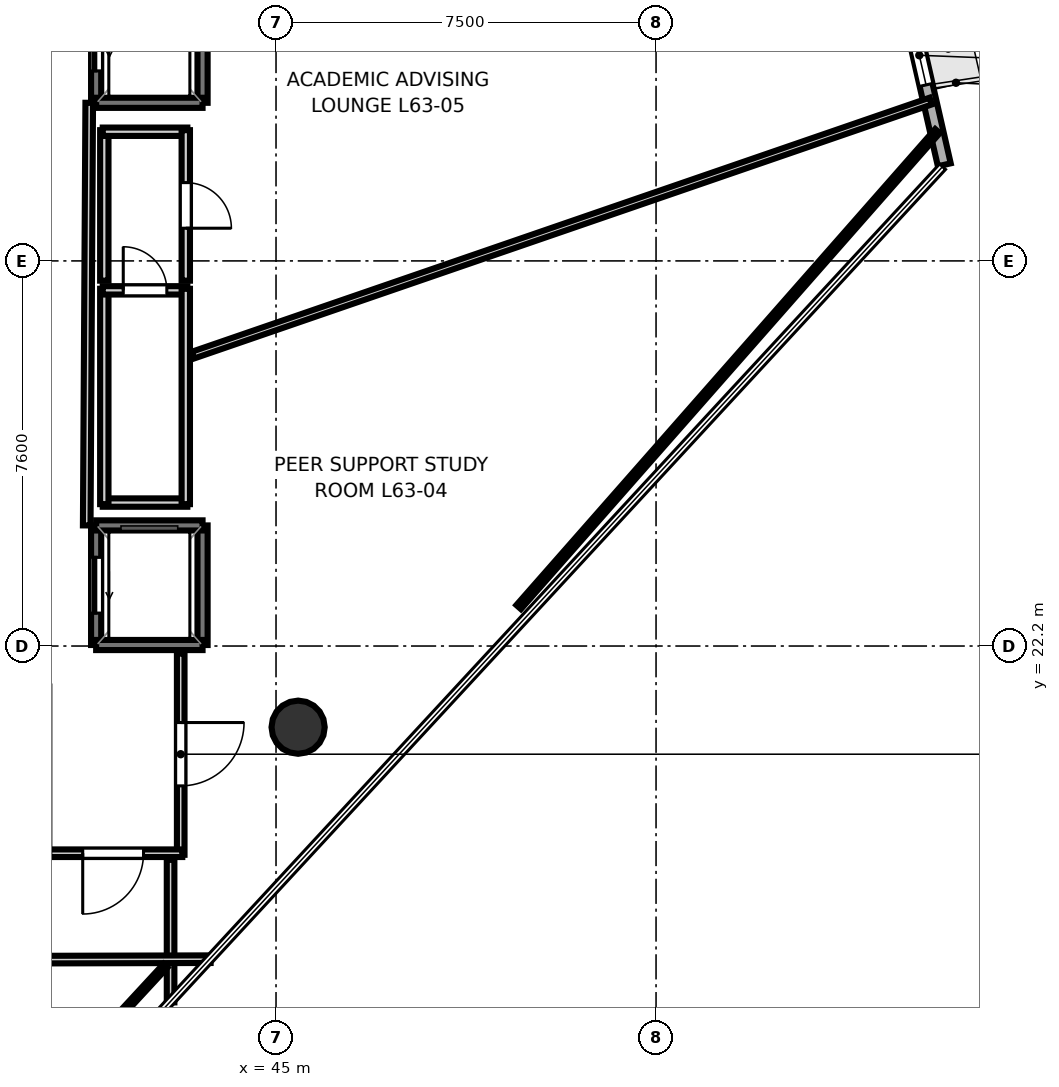
"""IFC4 building model, lengths in metres.
Left out: names, types, materials, properties, quantities, classifications, styles, units other than length and angle.
Written with IfcOpenShell. Run it as: python <this file> out.ifc"""

import sys

from ifc_helpers import new_model, si_unit, direction, frame, frame_2d, origin, origin_2d, place, context, subcontext, project, spatial, rectangle, hollow_circle, extrude, element, fill, save


model = new_model("IFC4")
c1 = context("Model", 3, precision=1e-05, world=origin(), true_north=direction((0.0, 1.0)))
c2 = subcontext(c1, "Body", "Model", "MODEL_VIEW")
j1 = project(units=[si_unit("LENGTHUNIT", "METRE"), si_unit("PLANEANGLEUNIT", "RADIAN")], contexts=[c1])
p1 = place(None, origin())
s1 = spatial("IfcSite", under=j1, at=p1, CompositionType="ELEMENT")
p2 = place(p1, origin())
s2 = spatial("IfcBuilding", under=s1, at=p2, CompositionType="ELEMENT")
p3 = place(p2, frame((0.0, 0.0, 246.4)))
s3 = spatial("IfcBuildingStorey", under=s2, at=p3, CompositionType="ELEMENT", Elevation=246.4)
p4 = place(p3, frame((45.436, 20.598, 0.0), z_axis=(0.0, 0.0, 1.0), x_axis=(1.0, 0.0, 0.0)))
e1 = element("IfcColumn", 1, at=p4, inside=s3, PredefinedType="COLUMN", context=c2, shape_type="SweptSolid", body=[
    extrude(hollow_circle(Radius=0.525, WallThickness=0.028, at=origin_2d()), origin(), (0.0, 0.0, 1.0), 3.7),
])
p5 = place(p3, frame((58.189, 31.697, 0.0), z_axis=(0.0, 0.0, 1.0), x_axis=(-0.222498189733, 0.974933103123, 0.0)))
e2 = element("IfcWall", 2, at=p5, inside=s3, PredefinedType="SOLIDWALL", context=c2, shape_type="SweptSolid", body=[
    extrude(rectangle(XDim=5.257, YDim=0.26, at=frame_2d((2.628, 0.0))), origin(), (0.0, 0.0, 1.0), 3.52),
])
p6 = place(p5, frame((1.617, 0.0, 0.9)))
e3 = element("IfcOpeningElement", 3, at=p6, cuts=e2, PredefinedType="OPENING", context=c2, shape_type="SweptSolid", body=[
    extrude(rectangle(XDim=1.2, YDim=2.0, at=frame_2d((0.6, 1.0))), frame((0.0, 0.14, 0.0), z_axis=(0.0, -1.0, 0.0), x_axis=(1.0, 0.0, 0.0)), (0.0, 0.0, 1.0), 0.28),
])
p7 = place(p3, frame((43.55, 22.22, 0.0), z_axis=(0.0, 0.0, 1.0), x_axis=(0.0, 1.0, 0.0)))
e4 = element("IfcWall", 4, at=p7, inside=s3, PredefinedType="SOLIDWALL", context=c2, shape_type="SweptSolid", body=[
    extrude(rectangle(XDim=2.36, YDim=0.2, at=frame_2d((1.18, 0.0))), origin(), (0.0, 0.0, 1.0), 3.52),
])
p8 = place(p3, frame((41.45, 22.22, 0.0), z_axis=(0.0, 0.0, 1.0), x_axis=(0.0, 1.0, 0.0)))
e5 = element("IfcWall", 5, at=p8, inside=s3, PredefinedType="SOLIDWALL", context=c2, shape_type="SweptSolid", body=[
    extrude(rectangle(XDim=2.36, YDim=0.2, at=frame_2d((1.18, 0.0))), origin(), (0.0, 0.0, 1.0), 3.52),
])
p9 = place(p8, frame((0.63, 0.0, 0.0)))
e6 = element("IfcOpeningElement", 6, at=p9, cuts=e5, PredefinedType="OPENING", context=c2, shape_type="SweptSolid", body=[
    extrude(rectangle(XDim=1.1, YDim=2.15, at=frame_2d((0.55, 1.075))), frame((0.0, 0.11, 0.0), z_axis=(0.0, -1.0, 0.0), x_axis=(1.0, 0.0, 0.0)), (0.0, 0.0, 1.0), 0.22),
])
for number, where, z_axis, x_axis in (
    (7, (41.45, 24.58, 0.0), (0.0, 0.0, 1.0), (1.0, 0.0, 0.0)),
    (8, (41.45, 22.22, 0.0), (0.0, 0.0, 1.0), (1.0, 0.0, 0.0)),
):
    element("IfcWall", number, at=place(p3, frame(where, z_axis=z_axis, x_axis=x_axis)), inside=s3, PredefinedType="SOLIDWALL", context=c2, shape_type="SweptSolid", body=[
        extrude(rectangle(XDim=2.1, YDim=0.2, at=frame_2d((1.05, 0.0))), origin(), (0.0, 0.0, 1.0), 3.52),
    ])
p10 = place(p3, frame((43.55, 32.92, 0.0), z_axis=(0.0, 0.0, 1.0), x_axis=(0.0, 1.0, 0.0)))
e9 = element("IfcWall", 9, at=p10, inside=s3, PredefinedType="SOLIDWALL", context=c2, shape_type="SweptSolid", body=[
    extrude(rectangle(XDim=2.36, YDim=0.2, at=frame_2d((1.18, 0.0))), origin(), (0.0, 0.0, 1.0), 3.52),
])
p11 = place(p3, frame((41.45, 32.92, 0.0), z_axis=(0.0, 0.0, 1.0), x_axis=(0.0, 1.0, 0.0)))
e10 = element("IfcWall", 10, at=p11, inside=s3, PredefinedType="SOLIDWALL", context=c2, shape_type="SweptSolid", body=[
    extrude(rectangle(XDim=2.36, YDim=0.2, at=frame_2d((1.18, 0.0))), origin(), (0.0, 0.0, 1.0), 3.52),
])
p12 = place(p11, frame((0.63, 0.0, 0.0)))
e11 = element("IfcOpeningElement", 11, at=p12, cuts=e10, PredefinedType="OPENING", context=c2, shape_type="SweptSolid", body=[
    extrude(rectangle(XDim=1.1, YDim=2.15, at=frame_2d((0.55, 1.075))), frame((0.0, 0.11, 0.0), z_axis=(0.0, -1.0, 0.0), x_axis=(1.0, 0.0, 0.0)), (0.0, 0.0, 1.0), 0.22),
])
p13 = place(p3, frame((41.45, 32.92, 0.0), z_axis=(0.0, 0.0, 1.0), x_axis=(1.0, 0.0, 0.0)))
e12 = element("IfcWall", 12, at=p13, inside=s3, PredefinedType="SOLIDWALL", context=c2, shape_type="SweptSolid", body=[
    extrude(rectangle(XDim=2.1, YDim=0.2, at=frame_2d((1.05, 0.0))), origin(), (0.0, 0.0, 1.0), 3.52),
])
p14 = place(p3, frame((41.313, 32.92, 0.0), z_axis=(0.0, 0.0, 1.0), x_axis=(-0.005942518022, -0.999982343084, 0.0)))
e13 = element("IfcWall", 13, at=p14, inside=s3, PredefinedType="PARTITIONING", context=c2, shape_type="SweptSolid", body=[
    extrude(rectangle(XDim=8.34, YDim=0.15, at=frame_2d((4.17, 0.0))), origin(), (0.0, 0.0, 1.0), 2.84),
])
p15 = place(p3, frame((43.119, 22.05, 0.0), z_axis=(0.0, 0.0, 1.0), x_axis=(0.0, -1.0, 0.0)))
e14 = element("IfcWall", 14, at=p15, inside=s3, PredefinedType="PARTITIONING", context=c2, shape_type="SweptSolid", body=[
    extrude(rectangle(XDim=3.97, YDim=0.15, at=frame_2d((1.985, 0.0))), origin(), (0.0, 0.0, 1.0), 2.84),
])
p16 = place(p15, frame((1.36, 0.0, 0.0)))
e15 = element("IfcOpeningElement", 15, at=p16, cuts=e14, PredefinedType="OPENING", context=c2, shape_type="SweptSolid", body=[
    extrude(rectangle(XDim=1.25, YDim=2.2, at=frame_2d((0.625, 1.1))), frame((0.0, 0.085, 0.0), z_axis=(0.0, -1.0, 0.0), x_axis=(1.0, 0.0, 0.0)), (0.0, 0.0, 1.0), 0.17),
])
p17 = place(p3, frame((43.15, 18.111, 0.0), z_axis=(0.0, 0.0, 1.0), x_axis=(-1.0, 0.0, 0.0)))
e16 = element("IfcWall", 16, at=p17, inside=s3, PredefinedType="PARTITIONING", context=c2, shape_type="SweptSolid", body=[
    extrude(rectangle(XDim=2.73, YDim=0.15, at=frame_2d((1.365, 0.0))), origin(), (0.0, 0.0, 1.0), 2.84),
])
p18 = place(p17, frame((0.765, 0.0, 0.0)))
e17 = element("IfcOpeningElement", 17, at=p18, cuts=e16, PredefinedType="OPENING", context=c2, shape_type="SweptSolid", body=[
    extrude(rectangle(XDim=1.2, YDim=2.15, at=frame_2d((0.6, 1.075))), frame((0.0, 0.085, 0.0), z_axis=(0.0, -1.0, 0.0), x_axis=(1.0, 0.0, 0.0)), (0.0, 0.0, 1.0), 0.17),
])
p19 = place(p3, frame((43.25, 25.031, 0.0), z_axis=(0.0, 0.0, 1.0), x_axis=(-1.0, 0.0, 0.0)))
e18 = element("IfcWall", 18, at=p19, inside=s3, PredefinedType="PLUMBINGWALL", context=c2, shape_type="SweptSolid", body=[
    extrude(rectangle(XDim=1.67, YDim=0.165, at=frame_2d((0.835, 0.0))), origin(), (0.0, 0.0, 1.0), 2.84),
])
p20 = place(p3, frame((41.611, 25.0, 0.0), z_axis=(0.0, 0.0, 1.0), x_axis=(0.0, 1.0, 0.0)))
e19 = element("IfcWall", 19, at=p20, inside=s3, PredefinedType="PLUMBINGWALL", context=c2, shape_type="SweptSolid", body=[
    extrude(rectangle(XDim=4.25, YDim=0.165, at=frame_2d((2.125, 0.0))), origin(), (0.0, 0.0, 1.0), 2.84),
])
p21 = place(p3, frame((41.58, 29.219, 0.0), z_axis=(0.0, 0.0, 1.0), x_axis=(1.0, 0.0, 0.0)))
e20 = element("IfcWall", 20, at=p21, inside=s3, PredefinedType="PLUMBINGWALL", context=c2, shape_type="SweptSolid", body=[
    extrude(rectangle(XDim=1.67, YDim=0.165, at=frame_2d((0.835, 0.0))), origin(), (0.0, 0.0, 1.0), 2.84),
])
p22 = place(p21, frame((0.405, 0.0, 0.0)))
e21 = element("IfcOpeningElement", 21, at=p22, cuts=e20, PredefinedType="OPENING", context=c2, shape_type="SweptSolid", body=[
    extrude(rectangle(XDim=0.86, YDim=2.05, at=frame_2d((0.43, 1.025))), frame((0.0, 0.093, 0.0), z_axis=(0.0, -1.0, 0.0), x_axis=(1.0, 0.0, 0.0)), (0.0, 0.0, 1.0), 0.185),
])
p23 = place(p3, frame((43.219, 29.25, 0.0), z_axis=(0.0, 0.0, 1.0), x_axis=(0.0, -1.0, 0.0)))
e22 = element("IfcWall", 22, at=p23, inside=s3, PredefinedType="PLUMBINGWALL", context=c2, shape_type="SweptSolid", body=[
    extrude(rectangle(XDim=4.25, YDim=0.165, at=frame_2d((2.125, 0.0))), origin(), (0.0, 0.0, 1.0), 2.84),
])
p24 = place(p3, frame((41.611, 29.41, 0.0), z_axis=(0.0, 0.0, 1.0), x_axis=(0.0, 1.0, 0.0)))
e23 = element("IfcWall", 23, at=p24, inside=s3, PredefinedType="PLUMBINGWALL", context=c2, shape_type="SweptSolid", body=[
    extrude(rectangle(XDim=2.97, YDim=0.165, at=frame_2d((1.485, 0.0))), origin(), (0.0, 0.0, 1.0), 2.84),
])
p25 = place(p3, frame((41.58, 32.349, 0.0), z_axis=(0.0, 0.0, 1.0), x_axis=(1.0, 0.0, 0.0)))
e24 = element("IfcWall", 24, at=p25, inside=s3, PredefinedType="PLUMBINGWALL", context=c2, shape_type="SweptSolid", body=[
    extrude(rectangle(XDim=1.67, YDim=0.165, at=frame_2d((0.835, 0.0))), origin(), (0.0, 0.0, 1.0), 2.84),
])
p26 = place(p3, frame((43.219, 32.38, 0.0), z_axis=(0.0, 0.0, 1.0), x_axis=(0.0, -1.0, 0.0)))
e25 = element("IfcWall", 25, at=p26, inside=s3, PredefinedType="PLUMBINGWALL", context=c2, shape_type="SweptSolid", body=[
    extrude(rectangle(XDim=2.97, YDim=0.165, at=frame_2d((1.485, 0.0))), origin(), (0.0, 0.0, 1.0), 2.84),
])
p27 = place(p26, frame((1.035, 0.0, 0.0)))
e26 = element("IfcOpeningElement", 26, at=p27, cuts=e25, PredefinedType="OPENING", context=c2, shape_type="SweptSolid", body=[
    extrude(rectangle(XDim=0.9, YDim=2.1, at=frame_2d((0.45, 1.05))), frame((0.0, 0.093, 0.0), z_axis=(0.0, -1.0, 0.0), x_axis=(1.0, 0.0, 0.0)), (0.0, 0.0, 1.0), 0.185),
])
p28 = place(p3, frame((42.919, 17.98, 0.0), z_axis=(0.0, 0.0, 1.0), x_axis=(0.0, -1.0, 0.0)))
e27 = element("IfcWall", 27, at=p28, inside=s3, PredefinedType="PARTITIONING", context=c2, shape_type="SweptSolid", body=[
    extrude(rectangle(XDim=2.812, YDim=0.15, at=frame_2d((1.406, 0.0))), origin(), (0.0, 0.0, 1.0), 2.84),
])
p29 = place(p3, frame((43.709, 16.02, 0.0), z_axis=(0.0, 0.0, 1.0), x_axis=(-0.999996657873, -0.002585390319, 0.0)))
e28 = element("IfcWall", 28, at=p29, inside=s3, PredefinedType="PARTITIONING", context=c2, shape_type="SweptSolid", body=[
    extrude(rectangle(XDim=15.109, YDim=0.15, at=frame_2d((7.554, 0.0))), origin(), (0.0, 0.0, 1.0), 2.84),
])
p30 = place(p29, frame((10.129, 0.0, 0.0)))
e29 = element("IfcOpeningElement", 29, at=p30, cuts=e28, PredefinedType="OPENING", context=c2, shape_type="SweptSolid", body=[
    extrude(rectangle(XDim=1.25, YDim=2.2, at=frame_2d((0.625, 1.1))), frame((0.0, 0.085, 0.0), z_axis=(0.0, -1.0, 0.0), x_axis=(1.0, 0.0, 0.0)), (0.0, 0.0, 1.0), 0.17),
])
p31 = place(p29, frame((3.337, 0.0, 0.0)))
e30 = element("IfcOpeningElement", 30, at=p31, cuts=e28, PredefinedType="OPENING", context=c2, shape_type="SweptSolid", body=[
    extrude(rectangle(XDim=1.25, YDim=2.2, at=frame_2d((0.625, 1.1))), frame((0.0, 0.085, 0.0), z_axis=(0.0, -1.0, 0.0), x_axis=(1.0, 0.0, 0.0)), (0.0, 0.0, 1.0), 0.17),
])
p32 = place(p3, frame((42.819, 15.891, 0.0), z_axis=(0.0, 0.0, 1.0), x_axis=(-0.679018444949, -0.734121210305, 0.0)))
e31 = element("IfcWall", 31, at=p32, inside=s3, PredefinedType="PARTITIONING", context=c2, shape_type="SweptSolid", body=[
    extrude(rectangle(XDim=10.062, YDim=0.105, at=frame_2d((5.031, 0.0))), origin(), (0.0, 0.0, 1.0), 2.84),
])
p33 = place(p3, frame((43.36, 27.941, 0.0), z_axis=(0.0, 0.0, 1.0), x_axis=(0.945522307721, 0.325557315388, 0.0)))
e32 = element("IfcWall", 32, at=p33, inside=s3, PredefinedType="PARTITIONING", context=c2, shape_type="SweptSolid", body=[
    extrude(rectangle(XDim=15.401, YDim=0.14, at=frame_2d((7.701, 0.0))), origin(), (0.0, 0.0, 1.0), 2.84),
])
p34 = place(p3, frame((58.054, 32.362, 0.0), z_axis=(0.0, 0.0, 1.0), x_axis=(-0.66055355448, -0.750778929954, 0.0)))
e33 = element("IfcWall", 33, at=p34, inside=s3, PredefinedType="PARTITIONING", context=c2, shape_type="SweptSolid", body=[
    extrude(rectangle(XDim=12.512, YDim=0.12, at=frame_2d((6.256, 0.0))), origin(), (0.0, 0.0, 1.0), 2.84),
])
p35 = place(p9, origin())
e34 = element("IfcDoor", 34, at=p35, inside=s3, OperationType="SLIDING_TO_LEFT", PredefinedType="DOOR", context=c2, shape_type="SweptSolid", body=[
    extrude(rectangle(XDim=1.1, YDim=2.15, at=frame_2d((0.55, 1.075))), frame((0.0, 0.025, 0.0), z_axis=(0.0, -1.0, 0.0), x_axis=(1.0, 0.0, 0.0)), (0.0, 0.0, 1.0), 0.05),
])
fill(e6, e34)
p36 = place(p12, origin())
e35 = element("IfcDoor", 35, at=p36, inside=s3, OperationType="SLIDING_TO_LEFT", PredefinedType="DOOR", context=c2, shape_type="SweptSolid", body=[
    extrude(rectangle(XDim=1.1, YDim=2.15, at=frame_2d((0.55, 1.075))), frame((0.0, 0.025, 0.0), z_axis=(0.0, -1.0, 0.0), x_axis=(1.0, 0.0, 0.0)), (0.0, 0.0, 1.0), 0.05),
])
fill(e11, e35)
p37 = place(p18, origin())
e36 = element("IfcDoor", 36, at=p37, inside=s3, OperationType="SINGLE_SWING_RIGHT", PredefinedType="DOOR", context=c2, shape_type="SweptSolid", body=[
    extrude(rectangle(XDim=1.2, YDim=2.15, at=frame_2d((0.6, 1.075))), frame((0.0, 0.025, 0.0), z_axis=(0.0, -1.0, 0.0), x_axis=(1.0, 0.0, 0.0)), (0.0, 0.0, 1.0), 0.05),
])
fill(e17, e36)
p38 = place(p16, origin())
e37 = element("IfcDoor", 37, at=p38, inside=s3, OperationType="SINGLE_SWING_LEFT", PredefinedType="DOOR", context=c2, shape_type="SweptSolid", body=[
    extrude(rectangle(XDim=1.25, YDim=2.2, at=frame_2d((0.625, 1.1))), frame((0.0, 0.025, 0.0), z_axis=(0.0, -1.0, 0.0), x_axis=(1.0, 0.0, 0.0)), (0.0, 0.0, 1.0), 0.05),
])
fill(e15, e37)
p39 = place(p27, origin())
e38 = element("IfcDoor", 38, at=p39, inside=s3, OperationType="SINGLE_SWING_RIGHT", PredefinedType="DOOR", context=c2, shape_type="SweptSolid", body=[
    extrude(rectangle(XDim=0.9, YDim=2.1, at=frame_2d((0.45, 1.05))), frame((0.0, 0.025, 0.0), z_axis=(0.0, -1.0, 0.0), x_axis=(1.0, 0.0, 0.0)), (0.0, 0.0, 1.0), 0.05),
])
fill(e26, e38)
p40 = place(p22, origin())
e39 = element("IfcDoor", 39, at=p40, inside=s3, OperationType="SINGLE_SWING_LEFT", PredefinedType="DOOR", context=c2, shape_type="SweptSolid", body=[
    extrude(rectangle(XDim=0.86, YDim=2.05, at=frame_2d((0.43, 1.025))), frame((0.0, 0.025, 0.0), z_axis=(0.0, -1.0, 0.0), x_axis=(1.0, 0.0, 0.0)), (0.0, 0.0, 1.0), 0.05),
])
fill(e21, e39)
p41 = place(p6, origin())
e40 = element("IfcWindow", 40, at=p41, inside=s3, PartitioningType="SINGLE_PANEL", PredefinedType="WINDOW", context=c2, shape_type="SweptSolid", body=[
    extrude(rectangle(XDim=1.2, YDim=2.0, at=frame_2d((0.6, 1.0))), frame((0.0, 0.03, 0.0), z_axis=(0.0, -1.0, 0.0), x_axis=(1.0, 0.0, 0.0)), (0.0, 0.0, 1.0), 0.06),
])
fill(e3, e40)
save(model, sys.argv[1])
